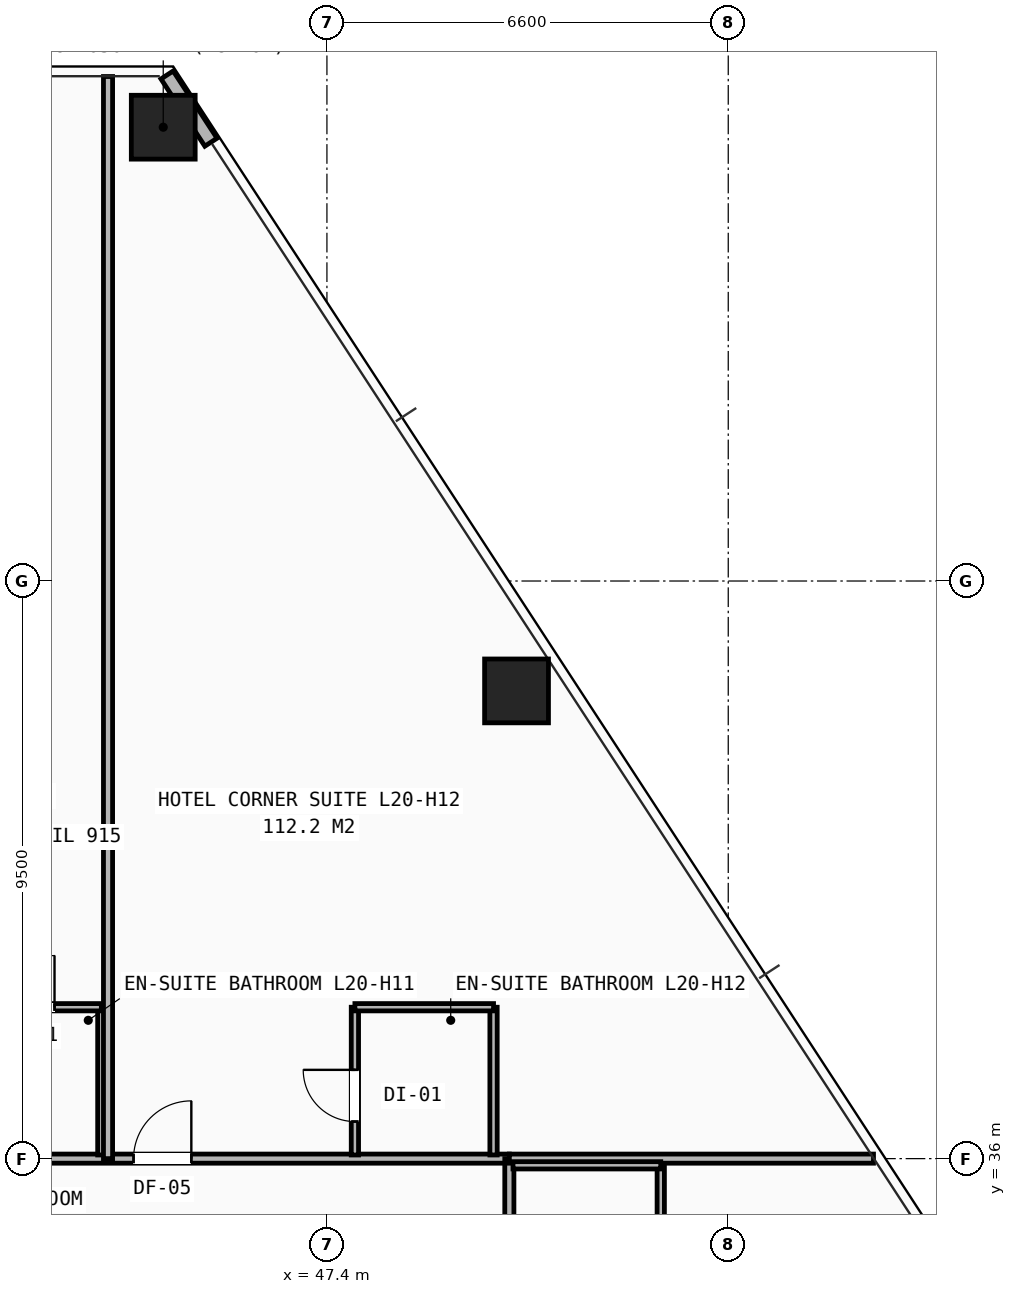
"""IFC4 building model, lengths in metres.
Left out: names, types, materials, properties, quantities, classifications, styles, units other than length and angle.
Written with IfcOpenShell. Run it as: python <this file> out.ifc"""

import sys

from ifc_helpers import new_model, si_unit, direction, frame, frame_2d, origin, origin_2d, place, context, subcontext, project, spatial, rectangle, hollow_rectangle, extrude, element, fill, save


model = new_model("IFC4")
c1 = context("Model", 3, precision=1e-05, world=origin(), true_north=direction((0.0, 1.0)))
c2 = subcontext(c1, "Body", "Model", "MODEL_VIEW")
j1 = project(units=[si_unit("LENGTHUNIT", "METRE"), si_unit("PLANEANGLEUNIT", "RADIAN")], contexts=[c1])
p1 = place(None, origin())
s1 = spatial("IfcSite", under=j1, at=p1, CompositionType="ELEMENT")
p2 = place(p1, origin())
s2 = spatial("IfcBuilding", under=s1, at=p2, CompositionType="ELEMENT")
p3 = place(p2, frame((0.0, 0.0, 73.4)))
s3 = spatial("IfcBuildingStorey", under=s2, at=p3, CompositionType="ELEMENT", Elevation=73.4)
for number, where, z_axis, x_axis in (
    (1, (44.708, 52.964, 0.0), (0.0, 0.0, 1.0), (1.0, 0.0, 0.0)),
    (2, (50.518, 43.692, 0.0), (0.0, 0.0, 1.0), (1.0, 0.0, 0.0)),
):
    element("IfcColumn", number, at=place(p3, frame(where, z_axis=z_axis, x_axis=x_axis)), inside=s3, PredefinedType="COLUMN", context=c2, shape_type="SweptSolid", body=[
        extrude(hollow_rectangle(XDim=1.05, YDim=1.05, WallThickness=0.07, at=origin_2d()), origin(), (0.0, 0.0, 1.0), 3.2),
    ])
p4 = place(p3, frame((45.493, 52.717, 0.0), z_axis=(0.0, 0.0, 1.0), x_axis=(-0.546222655951, 0.83764002419, 0.0)))
e3 = element("IfcWall", 3, at=p4, inside=s3, PredefinedType="SHEAR", context=c2, shape_type="SweptSolid", body=[
    extrude(rectangle(XDim=1.32, YDim=0.24, at=frame_2d((0.66, 0.0))), origin(), (0.0, 0.0, 1.0), 2.253),
])
p5 = place(p3, frame((40.75, 36.0, 0.0), z_axis=(0.0, 0.0, 1.0), x_axis=(1.0, 0.0, 0.0)))
e4 = element("IfcWall", 4, at=p5, inside=s3, PredefinedType="PARTITIONING", context=c2, shape_type="SweptSolid", body=[
    extrude(rectangle(XDim=9.65, YDim=0.15, at=frame_2d((4.825, 0.0))), origin(), (0.0, 0.0, 1.0), 2.503),
])
p6 = place(p5, frame((3.47, 0.0, 0.0)))
e5 = element("IfcOpeningElement", 5, at=p6, cuts=e4, PredefinedType="OPENING", context=c2, shape_type="SweptSolid", body=[
    extrude(rectangle(XDim=0.95, YDim=2.1, at=frame_2d((0.475, 1.05))), frame((0.0, 0.085, 0.0), z_axis=(0.0, -1.0, 0.0), x_axis=(1.0, 0.0, 0.0)), (0.0, 0.0, 1.0), 0.17),
])
p7 = place(p3, frame((50.4, 14.1, 0.0), z_axis=(0.0, 0.0, 1.0), x_axis=(0.0, 1.0, 0.0)))
e6 = element("IfcWall", 6, at=p7, inside=s3, PredefinedType="PARTITIONING", context=c2, shape_type="SweptSolid", body=[
    extrude(rectangle(XDim=21.9, YDim=0.15, at=frame_2d((10.95, 0.0))), origin(), (0.0, 0.0, 1.0), 2.421),
])
p8 = place(p7, frame((0.42, 0.0, 0.0)))
e7 = element("IfcOpeningElement", 7, at=p8, cuts=e6, PredefinedType="OPENING", context=c2, shape_type="SweptSolid", body=[
    extrude(rectangle(XDim=0.95, YDim=2.1, at=frame_2d((0.475, 1.05))), frame((0.0, 0.085, 0.0), z_axis=(0.0, -1.0, 0.0), x_axis=(1.0, 0.0, 0.0)), (0.0, 0.0, 1.0), 0.17),
])
p9 = place(p7, frame((11.82, 0.0, 0.0)))
e8 = element("IfcOpeningElement", 8, at=p9, cuts=e6, PredefinedType="OPENING", context=c2, shape_type="SweptSolid", body=[
    extrude(rectangle(XDim=0.95, YDim=2.1, at=frame_2d((0.475, 1.05))), frame((0.0, 0.085, 0.0), z_axis=(0.0, -1.0, 0.0), x_axis=(1.0, 0.0, 0.0)), (0.0, 0.0, 1.0), 0.17),
])
p10 = place(p3, frame((50.4, 36.0, 0.0), z_axis=(0.0, 0.0, 1.0), x_axis=(1.0, 0.0, 0.0)))
e9 = element("IfcWall", 9, at=p10, inside=s3, PredefinedType="PARTITIONING", context=c2, shape_type="SweptSolid", body=[
    extrude(rectangle(XDim=5.989, YDim=0.15, at=frame_2d((2.994, 0.0))), origin(), (0.0, 0.0, 1.0), 2.258),
])
p11 = place(p3, frame((52.89, 33.61, 0.0), z_axis=(0.0, 0.0, 1.0), x_axis=(0.0, 1.0, 0.0)))
e10 = element("IfcWall", 10, at=p11, inside=s3, PredefinedType="PARTITIONING", context=c2, shape_type="SweptSolid", body=[
    extrude(rectangle(XDim=2.28, YDim=0.12, at=frame_2d((1.14, 0.0))), origin(), (0.0, 0.0, 1.0), 2.97),
])
for number, where, z_axis, x_axis in (
    (11, (50.46, 35.89, 0.0), (0.0, 0.0, 1.0), (1.0, 0.0, 0.0)),
    (12, (43.69, 36.06, 0.0), (0.0, 0.0, 1.0), (0.0, 1.0, 0.0)),
):
    element("IfcWall", number, at=place(p3, frame(where, z_axis=z_axis, x_axis=x_axis)), inside=s3, PredefinedType="PARTITIONING", context=c2, shape_type="SweptSolid", body=[
        extrude(rectangle(XDim=2.43, YDim=0.12, at=frame_2d((1.215, 0.0))), origin(), (0.0, 0.0, 1.0), 2.97),
    ])
p12 = place(p3, frame((41.95, 38.49, 0.0), z_axis=(0.0, 0.0, 1.0), x_axis=(1.0, 0.0, 0.0)))
e13 = element("IfcWall", 13, at=p12, inside=s3, PredefinedType="PARTITIONING", context=c2, shape_type="SweptSolid", body=[
    extrude(rectangle(XDim=1.74, YDim=0.12, at=frame_2d((0.87, 0.0))), origin(), (0.0, 0.0, 1.0), 2.97),
])
p13 = place(p12, frame((0.12, 0.0, 0.0)))
e14 = element("IfcOpeningElement", 14, at=p13, cuts=e13, PredefinedType="OPENING", context=c2, shape_type="SweptSolid", body=[
    extrude(rectangle(XDim=0.85, YDim=2.05, at=frame_2d((0.425, 1.025))), frame((0.0, 0.07, 0.0), z_axis=(0.0, -1.0, 0.0), x_axis=(1.0, 0.0, 0.0)), (0.0, 0.0, 1.0), 0.14),
])
p14 = place(p3, frame((43.8, 36.0, 0.0), z_axis=(0.0, 0.0, 1.0), x_axis=(0.0, 1.0, 0.0)))
e15 = element("IfcWall", 15, at=p14, inside=s3, PredefinedType="PARTITIONING", context=c2, shape_type="SweptSolid", body=[
    extrude(rectangle(XDim=17.797, YDim=0.15, at=frame_2d((8.899, 0.0))), origin(), (0.0, 0.0, 1.0), 2.258),
])
p15 = place(p3, frame((47.86, 36.06, 0.0), z_axis=(0.0, 0.0, 1.0), x_axis=(0.0, 1.0, 0.0)))
e16 = element("IfcWall", 16, at=p15, inside=s3, PredefinedType="PARTITIONING", context=c2, shape_type="SweptSolid", body=[
    extrude(rectangle(XDim=2.43, YDim=0.12, at=frame_2d((1.215, 0.0))), origin(), (0.0, 0.0, 1.0), 2.503),
])
p16 = place(p15, frame((0.55, 0.0, 0.0)))
e17 = element("IfcOpeningElement", 17, at=p16, cuts=e16, PredefinedType="OPENING", context=c2, shape_type="SweptSolid", body=[
    extrude(rectangle(XDim=0.85, YDim=2.05, at=frame_2d((0.425, 1.025))), frame((0.0, 0.07, 0.0), z_axis=(0.0, -1.0, 0.0), x_axis=(1.0, 0.0, 0.0)), (0.0, 0.0, 1.0), 0.14),
])
p17 = place(p3, frame((50.14, 36.06, 0.0), z_axis=(0.0, 0.0, 1.0), x_axis=(0.0, 1.0, 0.0)))
e18 = element("IfcWall", 18, at=p17, inside=s3, PredefinedType="PARTITIONING", context=c2, shape_type="SweptSolid", body=[
    extrude(rectangle(XDim=2.43, YDim=0.12, at=frame_2d((1.215, 0.0))), origin(), (0.0, 0.0, 1.0), 2.503),
])
p18 = place(p3, frame((47.86, 38.49, 0.0), z_axis=(0.0, 0.0, 1.0), x_axis=(1.0, 0.0, 0.0)))
e19 = element("IfcWall", 19, at=p18, inside=s3, PredefinedType="PARTITIONING", context=c2, shape_type="SweptSolid", body=[
    extrude(rectangle(XDim=2.28, YDim=0.12, at=frame_2d((1.14, 0.0))), origin(), (0.0, 0.0, 1.0), 2.503),
])
p19 = place(p13, origin())
e20 = element("IfcDoor", 20, at=p19, inside=s3, OperationType="SINGLE_SWING_RIGHT", PredefinedType="DOOR", context=c2, shape_type="SweptSolid", body=[
    extrude(rectangle(XDim=0.85, YDim=2.05, at=frame_2d((0.425, 1.025))), frame((0.0, 0.025, 0.0), z_axis=(0.0, -1.0, 0.0), x_axis=(1.0, 0.0, 0.0)), (0.0, 0.0, 1.0), 0.05),
])
fill(e14, e20)
p20 = place(p6, origin())
e21 = element("IfcDoor", 21, at=p20, inside=s3, OperationType="SINGLE_SWING_RIGHT", PredefinedType="DOOR", context=c2, shape_type="SweptSolid", body=[
    extrude(rectangle(XDim=0.95, YDim=2.1, at=frame_2d((0.475, 1.05))), frame((0.0, 0.025, 0.0), z_axis=(0.0, -1.0, 0.0), x_axis=(1.0, 0.0, 0.0)), (0.0, 0.0, 1.0), 0.05),
])
fill(e5, e21)
p21 = place(p16, origin())
e22 = element("IfcDoor", 22, at=p21, inside=s3, OperationType="SINGLE_SWING_RIGHT", PredefinedType="DOOR", context=c2, shape_type="SweptSolid", body=[
    extrude(rectangle(XDim=0.85, YDim=2.05, at=frame_2d((0.425, 1.025))), frame((0.0, 0.025, 0.0), z_axis=(0.0, -1.0, 0.0), x_axis=(1.0, 0.0, 0.0)), (0.0, 0.0, 1.0), 0.05),
])
fill(e17, e22)
save(model, sys.argv[1])
